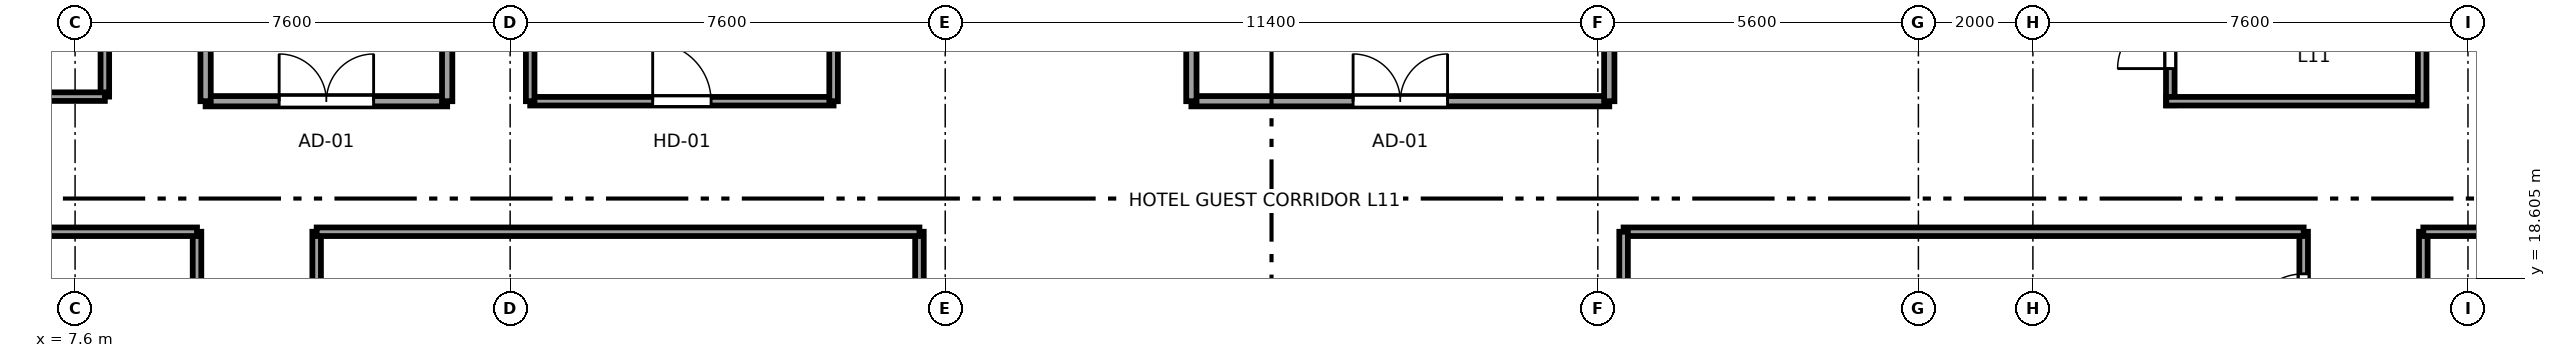
"""IFC4 building model, lengths in metres.
Left out: names, types, materials, properties, quantities, classifications, styles, units other than length and angle.
Written with IfcOpenShell. Run it as: python <this file> out.ifc"""

import sys

from ifc_helpers import new_model, si_unit, direction, frame, frame_2d, origin, place, context, subcontext, project, spatial, rectangle, extrude, source, transform, mapped, element, fill, save


model = new_model("IFC4")
c1 = context("Model", 3, precision=1e-05, world=origin(), true_north=direction((0.0, 1.0)))
c2 = subcontext(c1, "Body", "Model", "MODEL_VIEW")
j1 = project(units=[si_unit("LENGTHUNIT", "METRE"), si_unit("PLANEANGLEUNIT", "RADIAN")], contexts=[c1])
p1 = place(None, origin())
s1 = spatial("IfcSite", under=j1, at=p1, CompositionType="ELEMENT")
p2 = place(p1, origin())
s2 = spatial("IfcBuilding", under=s1, at=p2, CompositionType="ELEMENT")
p3 = place(p2, frame((0.0, 0.0, 49.75)))
s3 = spatial("IfcBuildingStorey", under=s2, at=p3, CompositionType="ELEMENT", Elevation=49.75)
p4 = place(p3, frame((9.73, 15.61, 0.0), z_axis=(0.0, 0.0, 1.0), x_axis=(0.0, 1.0, 0.0)))
e1 = element("IfcWall", 1, at=p4, inside=s3, PredefinedType="PARTITIONING", context=c2, shape_type="SweptSolid", body=[
    extrude(rectangle(XDim=3.81, YDim=0.15, at=frame_2d((1.905, 0.0))), origin(), (0.0, 0.0, 1.0), 3.37),
])
p5 = place(p4, frame((1.395, 0.0, 0.0)))
e2 = element("IfcOpeningElement", 2, at=p5, cuts=e1, PredefinedType="OPENING", context=c2, shape_type="SweptSolid", body=[
    extrude(rectangle(XDim=0.98, YDim=2.12, at=frame_2d((0.49, 1.06))), frame((0.0, 0.085, 0.0), z_axis=(0.0, -1.0, 0.0), x_axis=(1.0, 0.0, 0.0)), (0.0, 0.0, 1.0), 0.17),
])
p6 = place(p3, frame((0.405, 19.42, 0.0), z_axis=(0.0, 0.0, 1.0), x_axis=(1.0, 0.0, 0.0)))
e3 = element("IfcWall", 3, at=p6, inside=s3, PredefinedType="PARTITIONING", context=c2, shape_type="SweptSolid", body=[
    extrude(rectangle(XDim=9.325, YDim=0.15, at=frame_2d((4.663, 0.0))), origin(), (0.0, 0.0, 1.0), 3.37),
])
p7 = place(p3, frame((11.82, 16.81, 0.0), z_axis=(0.0, 0.0, 1.0), x_axis=(0.0, 1.0, 0.0)))
e4 = element("IfcWall", 4, at=p7, inside=s3, PredefinedType="PARTITIONING", context=c2, shape_type="SweptSolid", body=[
    extrude(rectangle(XDim=2.61, YDim=0.15, at=frame_2d((1.305, 0.0))), origin(), (0.0, 0.0, 1.0), 3.37),
])
p8 = place(p7, frame((0.795, 0.0, 0.0)))
e5 = element("IfcOpeningElement", 5, at=p8, cuts=e4, PredefinedType="OPENING", context=c2, shape_type="SweptSolid", body=[
    extrude(rectangle(XDim=0.98, YDim=2.12, at=frame_2d((0.49, 1.06))), frame((0.0, 0.085, 0.0), z_axis=(0.0, -1.0, 0.0), x_axis=(1.0, 0.0, 0.0)), (0.0, 0.0, 1.0), 0.17),
])
p9 = place(p3, frame((22.35, 14.88, 0.0), z_axis=(0.0, 0.0, 1.0), x_axis=(0.0, 1.0, 0.0)))
e6 = element("IfcWall", 6, at=p9, inside=s3, PredefinedType="PARTITIONING", context=c2, shape_type="SweptSolid", body=[
    extrude(rectangle(XDim=4.54, YDim=0.15, at=frame_2d((2.27, 0.0))), origin(), (0.0, 0.0, 1.0), 3.37),
])
p10 = place(p3, frame((11.82, 19.42, 0.0), z_axis=(0.0, 0.0, 1.0), x_axis=(1.0, 0.0, 0.0)))
e7 = element("IfcWall", 7, at=p10, inside=s3, PredefinedType="PARTITIONING", context=c2, shape_type="SweptSolid", body=[
    extrude(rectangle(XDim=10.53, YDim=0.15, at=frame_2d((5.265, 0.0))), origin(), (0.0, 0.0, 1.0), 3.37),
])
p11 = place(p3, frame((46.53, 17.01, 0.0), z_axis=(0.0, 0.0, 1.0), x_axis=(0.0, 1.0, 0.0)))
e8 = element("IfcWall", 8, at=p11, inside=s3, PredefinedType="PARTITIONING", context=c2, shape_type="SweptSolid", body=[
    extrude(rectangle(XDim=2.41, YDim=0.15, at=frame_2d((1.205, 0.0))), origin(), (0.0, 0.0, 1.0), 3.37),
])
p12 = place(p11, frame((0.695, 0.0, 0.0)))
e9 = element("IfcOpeningElement", 9, at=p12, cuts=e8, PredefinedType="OPENING", context=c2, shape_type="SweptSolid", body=[
    extrude(rectangle(XDim=0.98, YDim=2.12, at=frame_2d((0.49, 1.06))), frame((0.0, 0.085, 0.0), z_axis=(0.0, -1.0, 0.0), x_axis=(1.0, 0.0, 0.0)), (0.0, 0.0, 1.0), 0.17),
])
p13 = place(p3, frame((34.65, 19.42, 0.0), z_axis=(0.0, 0.0, 1.0), x_axis=(1.0, 0.0, 0.0)))
e10 = element("IfcWall", 10, at=p13, inside=s3, PredefinedType="PARTITIONING", context=c2, shape_type="SweptSolid", body=[
    extrude(rectangle(XDim=11.88, YDim=0.15, at=frame_2d((5.94, 0.0))), origin(), (0.0, 0.0, 1.0), 3.37),
])
p14 = place(p3, frame((34.65, 15.08, 0.0), z_axis=(0.0, 0.0, 1.0), x_axis=(0.0, 1.0, 0.0)))
e11 = element("IfcWall", 11, at=p14, inside=s3, PredefinedType="PARTITIONING", context=c2, shape_type="SweptSolid", body=[
    extrude(rectangle(XDim=4.34, YDim=0.15, at=frame_2d((2.17, 0.0))), origin(), (0.0, 0.0, 1.0), 3.37),
])
p15 = place(p3, frame((48.62, 15.41, 0.0), z_axis=(0.0, 0.0, 1.0), x_axis=(0.0, 1.0, 0.0)))
e12 = element("IfcWall", 12, at=p15, inside=s3, PredefinedType="PARTITIONING", context=c2, shape_type="SweptSolid", body=[
    extrude(rectangle(XDim=4.01, YDim=0.15, at=frame_2d((2.005, 0.0))), origin(), (0.0, 0.0, 1.0), 3.37),
])
p16 = place(p15, frame((1.795, 0.0, 0.0)))
e13 = element("IfcOpeningElement", 13, at=p16, cuts=e12, PredefinedType="OPENING", context=c2, shape_type="SweptSolid", body=[
    extrude(rectangle(XDim=0.98, YDim=2.12, at=frame_2d((0.49, 1.06))), frame((0.0, 0.085, 0.0), z_axis=(0.0, -1.0, 0.0), x_axis=(1.0, 0.0, 0.0)), (0.0, 0.0, 1.0), 0.17),
])
p17 = place(p3, frame((48.62, 19.42, 0.0), z_axis=(0.0, 0.0, 1.0), x_axis=(1.0, 0.0, 0.0)))
e14 = element("IfcWall", 14, at=p17, inside=s3, PredefinedType="PARTITIONING", context=c2, shape_type="SweptSolid", body=[
    extrude(rectangle(XDim=7.975, YDim=0.15, at=frame_2d((3.987, 0.0))), origin(), (0.0, 0.0, 1.0), 3.37),
])
p18 = place(p3, frame((8.12, 21.78, 0.0), z_axis=(0.0, 0.0, 1.0), x_axis=(0.0, 1.0, 0.0)))
e15 = element("IfcWall", 15, at=p18, inside=s3, PredefinedType="PARTITIONING", context=c2, shape_type="SweptSolid", body=[
    extrude(rectangle(XDim=5.24, YDim=0.15, at=frame_2d((2.62, 0.0))), origin(), (0.0, 0.0, 1.0), 3.37),
])
p19 = place(p18, frame((3.93, 0.0, 0.0)))
e16 = element("IfcOpeningElement", 16, at=p19, cuts=e15, PredefinedType="OPENING", context=c2, shape_type="SweptSolid", body=[
    extrude(rectangle(XDim=0.98, YDim=2.12, at=frame_2d((0.49, 1.06))), frame((0.0, 0.085, 0.0), z_axis=(0.0, -1.0, 0.0), x_axis=(1.0, 0.0, 0.0)), (0.0, 0.0, 1.0), 0.17),
])
p20 = place(p3, frame((0.405, 21.78, 0.0), z_axis=(0.0, 0.0, 1.0), x_axis=(1.0, 0.0, 0.0)))
e17 = element("IfcWall", 17, at=p20, inside=s3, PredefinedType="PARTITIONING", context=c2, shape_type="SweptSolid", body=[
    extrude(rectangle(XDim=7.715, YDim=0.15, at=frame_2d((3.857, 0.0))), origin(), (0.0, 0.0, 1.0), 3.37),
])
p21 = place(p3, frame((44.2, 21.63, 0.0), z_axis=(0.0, 0.0, 1.0), x_axis=(0.0, 1.0, 0.0)))
e18 = element("IfcWall", 18, at=p21, inside=s3, PredefinedType="PARTITIONING", context=c2, shape_type="SweptSolid", body=[
    extrude(rectangle(XDim=2.54, YDim=0.15, at=frame_2d((1.27, 0.0))), origin(), (0.0, 0.0, 1.0), 3.37),
])
p22 = place(p21, frame((0.64, 0.0, 0.0)))
e19 = element("IfcOpeningElement", 19, at=p22, cuts=e18, PredefinedType="OPENING", context=c2, shape_type="SweptSolid", body=[
    extrude(rectangle(XDim=0.92, YDim=2.01, at=frame_2d((0.46, 1.005))), frame((0.0, 0.085, 0.0), z_axis=(0.0, -1.0, 0.0), x_axis=(1.0, 0.0, 0.0)), (0.0, 0.0, 1.0), 0.17),
])
p23 = place(p3, frame((44.13, 21.7, 0.0), z_axis=(0.0, 0.0, 1.0), x_axis=(1.0, 0.0, 0.0)))
e20 = element("IfcWall", 20, at=p23, inside=s3, PredefinedType="PARTITIONING", context=c2, shape_type="SweptSolid", body=[
    extrude(rectangle(XDim=4.54, YDim=0.15, at=frame_2d((2.27, 0.0))), origin(), (0.0, 0.0, 1.0), 3.37),
])
p24 = place(p3, frame((48.6, 21.63, 0.0), z_axis=(0.0, 0.0, 1.0), x_axis=(0.0, 1.0, 0.0)))
e21 = element("IfcWall", 21, at=p24, inside=s3, PredefinedType="PARTITIONING", context=c2, shape_type="SweptSolid", body=[
    extrude(rectangle(XDim=2.54, YDim=0.15, at=frame_2d((1.27, 0.0))), origin(), (0.0, 0.0, 1.0), 3.37),
])
p25 = place(p3, frame((9.88, 21.7, 0.0), z_axis=(0.0, 0.0, 1.0), x_axis=(1.0, 0.0, 0.0)))
e22 = element("IfcWall", 22, at=p25, inside=s3, PredefinedType="PARTITIONING", context=c2, shape_type="SweptSolid", body=[
    extrude(rectangle(XDim=4.22, YDim=0.18, at=frame_2d((2.11, 0.0))), origin(), (0.0, 0.0, 1.0), 3.37),
])
p26 = place(p25, frame((1.285, 0.0, 0.0)))
e23 = element("IfcOpeningElement", 23, at=p26, cuts=e22, PredefinedType="OPENING", context=c2, shape_type="SweptSolid", body=[
    extrude(rectangle(XDim=1.65, YDim=2.15, at=frame_2d((0.825, 1.075))), frame((0.0, 0.1, 0.0), z_axis=(0.0, -1.0, 0.0), x_axis=(1.0, 0.0, 0.0)), (0.0, 0.0, 1.0), 0.2),
])
for number, where, z_axis, x_axis in (
    (24, (9.88, 21.7, 0.0), (0.0, 0.0, 1.0), (0.0, 1.0, 0.0)),
    (25, (14.1, 21.7, 0.0), (0.0, 0.0, 1.0), (0.0, 1.0, 0.0)),
):
    element("IfcWall", number, at=place(p3, frame(where, z_axis=z_axis, x_axis=x_axis)), inside=s3, PredefinedType="PARTITIONING", context=c2, shape_type="SweptSolid", body=[
        extrude(rectangle(XDim=8.05, YDim=0.18, at=frame_2d((4.025, 0.0))), origin(), (0.0, 0.0, 1.0), 3.37),
    ])
p27 = place(p3, frame((27.1, 21.7, 0.0), z_axis=(0.0, 0.0, 1.0), x_axis=(1.0, 0.0, 0.0)))
e26 = element("IfcWall", 26, at=p27, inside=s3, PredefinedType="PARTITIONING", context=c2, shape_type="SweptSolid", body=[
    extrude(rectangle(XDim=7.3, YDim=0.18, at=frame_2d((3.65, 0.0))), origin(), (0.0, 0.0, 1.0), 3.37),
])
p28 = place(p27, frame((2.825, 0.0, 0.0)))
e27 = element("IfcOpeningElement", 27, at=p28, cuts=e26, PredefinedType="OPENING", context=c2, shape_type="SweptSolid", body=[
    extrude(rectangle(XDim=1.65, YDim=2.15, at=frame_2d((0.825, 1.075))), frame((0.0, 0.1, 0.0), z_axis=(0.0, -1.0, 0.0), x_axis=(1.0, 0.0, 0.0)), (0.0, 0.0, 1.0), 0.2),
])
for number, where, z_axis, x_axis in (
    (28, (27.1, 21.7, 0.0), (0.0, 0.0, 1.0), (0.0, 1.0, 0.0)),
    (29, (34.4, 21.7, 0.0), (0.0, 0.0, 1.0), (0.0, 1.0, 0.0)),
):
    element("IfcWall", number, at=place(p3, frame(where, z_axis=z_axis, x_axis=x_axis)), inside=s3, PredefinedType="PARTITIONING", context=c2, shape_type="SweptSolid", body=[
        extrude(rectangle(XDim=8.1, YDim=0.18, at=frame_2d((4.05, 0.0))), origin(), (0.0, 0.0, 1.0), 3.37),
    ])
p29 = place(p3, frame((15.55, 21.7, 0.0), z_axis=(0.0, 0.0, 1.0), x_axis=(1.0, 0.0, 0.0)))
e30 = element("IfcWall", 30, at=p29, inside=s3, PredefinedType="PARTITIONING", context=c2, shape_type="SweptSolid", body=[
    extrude(rectangle(XDim=5.3, YDim=0.15, at=frame_2d((2.65, 0.0))), origin(), (0.0, 0.0, 1.0), 3.37),
])
p30 = place(p29, frame((2.14, 0.0, 0.0)))
e31 = element("IfcOpeningElement", 31, at=p30, cuts=e30, PredefinedType="OPENING", context=c2, shape_type="SweptSolid", body=[
    extrude(rectangle(XDim=1.02, YDim=2.03, at=frame_2d((0.51, 1.015))), frame((0.0, 0.085, 0.0), z_axis=(0.0, -1.0, 0.0), x_axis=(1.0, 0.0, 0.0)), (0.0, 0.0, 1.0), 0.17),
])
for number, where, z_axis, x_axis in (
    (32, (15.55, 21.7, 0.0), (0.0, 0.0, 1.0), (0.0, 1.0, 0.0)),
    (33, (20.85, 21.7, 0.0), (0.0, 0.0, 1.0), (0.0, 1.0, 0.0)),
):
    element("IfcWall", number, at=place(p3, frame(where, z_axis=z_axis, x_axis=x_axis)), inside=s3, PredefinedType="PARTITIONING", context=c2, shape_type="SweptSolid", body=[
        extrude(rectangle(XDim=8.1, YDim=0.15, at=frame_2d((4.05, 0.0))), origin(), (0.0, 0.0, 1.0), 3.37),
    ])
m1 = source(origin(), c2, "Body", "SweptSolid", [
    extrude(rectangle(XDim=0.98, YDim=2.12, at=frame_2d((0.49, 1.06))), frame((0.0, 0.025, 0.0), z_axis=(0.0, -1.0, 0.0), x_axis=(1.0, 0.0, 0.0)), (0.0, 0.0, 1.0), 0.05),
])
p31 = place(p12, origin())
e34 = element("IfcDoor", 34, at=p31, inside=s3, OperationType="SINGLE_SWING_LEFT", PredefinedType="DOOR", context=c2, shape_type="MappedRepresentation", body=[
    mapped(m1, transform((0.0, 0.0, 0.0), x_axis=(1.0, 0.0, 0.0), y_axis=(0.0, 1.0, 0.0), z_axis=(0.0, 0.0, 1.0), scale=1.0)),
])
fill(e9, e34)
m2 = source(origin(), c2, "Body", "SweptSolid", [
    extrude(rectangle(XDim=0.92, YDim=2.01, at=frame_2d((0.46, 1.005))), frame((0.0, 0.025, 0.0), z_axis=(0.0, -1.0, 0.0), x_axis=(1.0, 0.0, 0.0)), (0.0, 0.0, 1.0), 0.05),
])
p32 = place(p22, origin())
e35 = element("IfcDoor", 35, at=p32, inside=s3, OperationType="SINGLE_SWING_LEFT", PredefinedType="DOOR", context=c2, shape_type="MappedRepresentation", body=[
    mapped(m2, transform((0.0, 0.0, 0.0), x_axis=(1.0, 0.0, 0.0), y_axis=(0.0, 1.0, 0.0), z_axis=(0.0, 0.0, 1.0), scale=1.0)),
])
fill(e19, e35)
m3 = source(origin(), c2, "Body", "SweptSolid", [
    extrude(rectangle(XDim=1.65, YDim=2.15, at=frame_2d((0.825, 1.075))), frame((0.0, 0.025, 0.0), z_axis=(0.0, -1.0, 0.0), x_axis=(1.0, 0.0, 0.0)), (0.0, 0.0, 1.0), 0.05),
])
p33 = place(p26, origin())
e36 = element("IfcDoor", 36, at=p33, inside=s3, OperationType="DOUBLE_DOOR_SINGLE_SWING", PredefinedType="DOOR", context=c2, shape_type="MappedRepresentation", body=[
    mapped(m3, transform((0.0, 0.0, 0.0), x_axis=(1.0, 0.0, 0.0), y_axis=(0.0, 1.0, 0.0), z_axis=(0.0, 0.0, 1.0), scale=1.0)),
])
fill(e23, e36)
p34 = place(p28, origin())
e37 = element("IfcDoor", 37, at=p34, inside=s3, OperationType="DOUBLE_DOOR_SINGLE_SWING", PredefinedType="DOOR", context=c2, shape_type="MappedRepresentation", body=[
    mapped(m3, transform((0.0, 0.0, 0.0), x_axis=(1.0, 0.0, 0.0), y_axis=(0.0, 1.0, 0.0), z_axis=(0.0, 0.0, 1.0), scale=1.0)),
])
fill(e27, e37)
m4 = source(origin(), c2, "Body", "SweptSolid", [
    extrude(rectangle(XDim=1.02, YDim=2.03, at=frame_2d((0.51, 1.015))), frame((0.0, 0.025, 0.0), z_axis=(0.0, -1.0, 0.0), x_axis=(1.0, 0.0, 0.0)), (0.0, 0.0, 1.0), 0.05),
])
p35 = place(p30, origin())
e38 = element("IfcDoor", 38, at=p35, inside=s3, OperationType="SINGLE_SWING_LEFT", PredefinedType="DOOR", context=c2, shape_type="MappedRepresentation", body=[
    mapped(m4, transform((0.0, 0.0, 0.0), x_axis=(1.0, 0.0, 0.0), y_axis=(0.0, 1.0, 0.0), z_axis=(0.0, 0.0, 1.0), scale=1.0)),
])
fill(e31, e38)
save(model, sys.argv[1])
